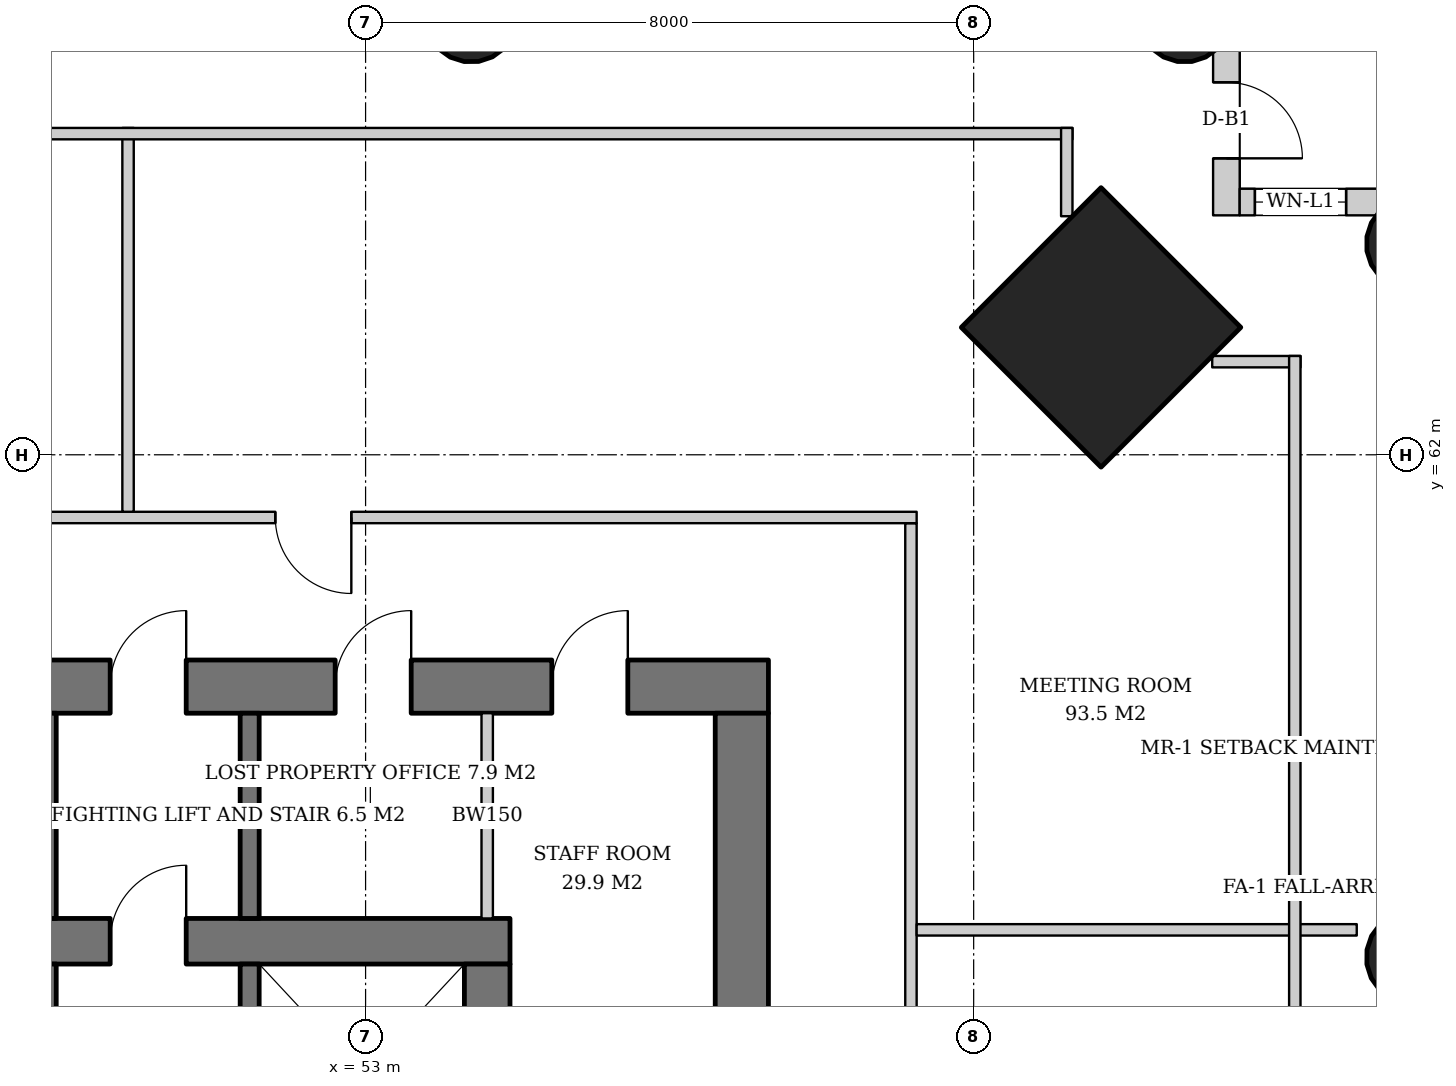
"""IFC4 building model, lengths in metres.
Left out: names, types, materials, properties, quantities, classifications, styles, units other than length and angle.
Written with IfcOpenShell. Run it as: python <this file> out.ifc"""

import sys

from ifc_helpers import new_model, si_unit, direction, frame, frame_2d, origin, origin_2d, place, context, subcontext, project, spatial, rectangle, hollow_circle, extrude, element, fill, save


model = new_model("IFC4")
c1 = context("Model", 3, precision=1e-05, world=origin(), true_north=direction((0.0, 1.0)))
c2 = subcontext(c1, "Body", "Model", "MODEL_VIEW")
j1 = project(units=[si_unit("LENGTHUNIT", "METRE"), si_unit("PLANEANGLEUNIT", "RADIAN")], contexts=[c1])
p1 = place(None, origin())
s1 = spatial("IfcSite", under=j1, at=p1, CompositionType="ELEMENT")
p2 = place(p1, origin())
s2 = spatial("IfcBuilding", under=s1, at=p2, CompositionType="ELEMENT")
p3 = place(p2, frame((0.0, 0.0, 89.4)))
s3 = spatial("IfcBuildingStorey", under=s2, at=p3, CompositionType="ELEMENT", Elevation=89.4)
p4 = place(p3, frame((62.714, 63.714, 0.0), z_axis=(-0.031962158256, -0.031962158256, 0.998977898093), x_axis=(0.707106781187, -0.707106781187, 0.0)))
e1 = element("IfcColumn", 1, at=p4, inside=s3, PredefinedType="COLUMN", context=c2, shape_type="SweptSolid", body=[
    extrude(rectangle(XDim=2.6, YDim=2.6, at=origin_2d()), origin(), (0.0, 0.0, 1.0), 3.804),
])
p5 = place(p3, frame((66.814, 64.814, 0.0), z_axis=(-0.031898107953, -0.031898107953, 0.998981992539), x_axis=(0.707106781187, -0.707106781187, 0.0)))
e2 = element("IfcColumn", 2, at=p5, inside=s3, PredefinedType="COLUMN", context=c2, shape_type="SweptSolid", body=[
    extrude(hollow_circle(Radius=0.61, WallThickness=0.04, at=origin_2d()), origin(), (0.0, 0.0, 1.0), 3.804),
])
p6 = place(p3, frame((66.814, 55.407, 0.0), z_axis=(-0.031910269556, -0.015987237665, 0.999362868496), x_axis=(0.447933021895, -0.894067115991, 0.0)))
e3 = element("IfcColumn", 3, at=p6, inside=s3, PredefinedType="COLUMN", context=c2, shape_type="SweptSolid", body=[
    extrude(hollow_circle(Radius=0.61, WallThickness=0.04, at=origin_2d()), origin(), (0.0, 0.0, 1.0), 3.802),
])
p7 = place(p3, frame((63.814, 67.814, 0.0), z_axis=(-0.031898107953, -0.031898107953, 0.998981992539), x_axis=(0.707106781187, -0.707106781187, 0.0)))
e4 = element("IfcColumn", 4, at=p7, inside=s3, PredefinedType="COLUMN", context=c2, shape_type="SweptSolid", body=[
    extrude(hollow_circle(Radius=0.61, WallThickness=0.04, at=origin_2d()), origin(), (0.0, 0.0, 1.0), 3.804),
])
p8 = place(p3, frame((54.407, 67.814, 0.0), z_axis=(-0.015987237665, -0.031910269556, 0.999362868496), x_axis=(0.894067115991, -0.447933021895, 0.0)))
e5 = element("IfcColumn", 5, at=p8, inside=s3, PredefinedType="COLUMN", context=c2, shape_type="SweptSolid", body=[
    extrude(hollow_circle(Radius=0.61, WallThickness=0.04, at=origin_2d()), origin(), (0.0, 0.0, 1.0), 3.802),
])
p9 = place(p3, frame((35.1, 55.6, 0.0), z_axis=(0.0, 0.0, 1.0), x_axis=(1.0, 0.0, 0.0)))
e6 = element("IfcWall", 6, at=p9, inside=s3, PredefinedType="SHEAR", context=c2, shape_type="SweptSolid", body=[
    extrude(rectangle(XDim=19.8, YDim=0.6, at=frame_2d((9.9, 0.0))), origin(), (0.0, 0.0, 1.0), 3.8),
])
p10 = place(p9, frame((14.54, 0.0, 0.0)))
e7 = element("IfcOpeningElement", 7, at=p10, cuts=e6, PredefinedType="OPENING", context=c2, shape_type="SweptSolid", body=[
    extrude(rectangle(XDim=1.0, YDim=2.1, at=frame_2d((0.5, 1.05))), frame((0.0, 0.31, 0.0), z_axis=(0.0, -1.0, 0.0), x_axis=(1.0, 0.0, 0.0)), (0.0, 0.0, 1.0), 0.62),
])
p11 = place(p9, frame((2.425, 0.0, 0.0)))
e8 = element("IfcOpeningElement", 8, at=p11, cuts=e6, PredefinedType="OPENING", context=c2, shape_type="SweptSolid", body=[
    extrude(rectangle(XDim=1.0, YDim=2.1, at=frame_2d((0.5, 1.05))), frame((0.0, 0.31, 0.0), z_axis=(0.0, -1.0, 0.0), x_axis=(1.0, 0.0, 0.0)), (0.0, 0.0, 1.0), 0.62),
])
p12 = place(p3, frame((54.6, 36.7, 0.0), z_axis=(0.0, 0.0, 1.0), x_axis=(0.0, 1.0, 0.0)))
e9 = element("IfcWall", 9, at=p12, inside=s3, PredefinedType="SHEAR", context=c2, shape_type="SweptSolid", body=[
    extrude(rectangle(XDim=18.6, YDim=0.6, at=frame_2d((9.3, 0.0))), origin(), (0.0, 0.0, 1.0), 3.8),
])
p13 = place(p12, frame((8.4, 0.0, 0.0)))
e10 = element("IfcOpeningElement", 10, at=p13, cuts=e9, PredefinedType="OPENING", context=c2, shape_type="SweptSolid", body=[
    extrude(rectangle(XDim=1.8, YDim=2.4, at=frame_2d((0.9, 1.2))), frame((0.0, 0.31, 0.0), z_axis=(0.0, -1.0, 0.0), x_axis=(1.0, 0.0, 0.0)), (0.0, 0.0, 1.0), 0.62),
])
p14 = place(p3, frame((31.7, 58.95, 0.0), z_axis=(0.0, 0.0, 1.0), x_axis=(1.0, 0.0, 0.0)))
e11 = element("IfcWall", 11, at=p14, inside=s3, PredefinedType="SHEAR", context=c2, shape_type="SweptSolid", body=[
    extrude(rectangle(XDim=26.6, YDim=0.7, at=frame_2d((13.3, 0.0))), origin(), (0.0, 0.0, 1.0), 3.8),
])
p15 = place(p14, frame((17.94, 0.0, 0.0)))
e12 = element("IfcOpeningElement", 12, at=p15, cuts=e11, PredefinedType="OPENING", context=c2, shape_type="SweptSolid", body=[
    extrude(rectangle(XDim=1.0, YDim=2.1, at=frame_2d((0.5, 1.05))), frame((0.0, 0.36, 0.0), z_axis=(0.0, -1.0, 0.0), x_axis=(1.0, 0.0, 0.0)), (0.0, 0.0, 1.0), 0.72),
])
p16 = place(p14, frame((5.825, 0.0, 0.0)))
e13 = element("IfcOpeningElement", 13, at=p16, cuts=e11, PredefinedType="OPENING", context=c2, shape_type="SweptSolid", body=[
    extrude(rectangle(XDim=1.0, YDim=2.1, at=frame_2d((0.5, 1.05))), frame((0.0, 0.36, 0.0), z_axis=(0.0, -1.0, 0.0), x_axis=(1.0, 0.0, 0.0)), (0.0, 0.0, 1.0), 0.72),
])
p17 = place(p14, frame((1.837, 0.0, 0.0)))
e14 = element("IfcOpeningElement", 14, at=p17, cuts=e11, PredefinedType="OPENING", context=c2, shape_type="SweptSolid", body=[
    extrude(rectangle(XDim=1.0, YDim=2.1, at=frame_2d((0.5, 1.05))), frame((0.0, 0.36, 0.0), z_axis=(0.0, -1.0, 0.0), x_axis=(1.0, 0.0, 0.0)), (0.0, 0.0, 1.0), 0.72),
])
p18 = place(p14, frame((3.781, 0.0, 0.0)))
e15 = element("IfcOpeningElement", 15, at=p18, cuts=e11, PredefinedType="OPENING", context=c2, shape_type="SweptSolid", body=[
    extrude(rectangle(XDim=1.0, YDim=2.1, at=frame_2d((0.5, 1.05))), frame((0.0, 0.36, 0.0), z_axis=(0.0, -1.0, 0.0), x_axis=(1.0, 0.0, 0.0)), (0.0, 0.0, 1.0), 0.72),
])
p19 = place(p14, frame((11.577, 0.0, 0.0)))
e16 = element("IfcOpeningElement", 16, at=p19, cuts=e11, PredefinedType="OPENING", context=c2, shape_type="SweptSolid", body=[
    extrude(rectangle(XDim=1.0, YDim=2.1, at=frame_2d((0.5, 1.05))), frame((0.0, 0.36, 0.0), z_axis=(0.0, -1.0, 0.0), x_axis=(1.0, 0.0, 0.0)), (0.0, 0.0, 1.0), 0.72),
])
p20 = place(p14, frame((20.9, 0.0, 0.0)))
e17 = element("IfcOpeningElement", 17, at=p20, cuts=e11, PredefinedType="OPENING", context=c2, shape_type="SweptSolid", body=[
    extrude(rectangle(XDim=1.0, YDim=2.1, at=frame_2d((0.5, 1.05))), frame((0.0, 0.36, 0.0), z_axis=(0.0, -1.0, 0.0), x_axis=(1.0, 0.0, 0.0)), (0.0, 0.0, 1.0), 0.72),
])
p21 = place(p14, frame((23.75, 0.0, 0.0)))
e18 = element("IfcOpeningElement", 18, at=p21, cuts=e11, PredefinedType="OPENING", context=c2, shape_type="SweptSolid", body=[
    extrude(rectangle(XDim=1.0, YDim=2.1, at=frame_2d((0.5, 1.05))), frame((0.0, 0.36, 0.0), z_axis=(0.0, -1.0, 0.0), x_axis=(1.0, 0.0, 0.0)), (0.0, 0.0, 1.0), 0.72),
])
p22 = place(p3, frame((57.95, 33.4, 0.0), z_axis=(0.0, 0.0, 1.0), x_axis=(0.0, 1.0, 0.0)))
e19 = element("IfcWall", 19, at=p22, inside=s3, PredefinedType="SHEAR", context=c2, shape_type="SweptSolid", body=[
    extrude(rectangle(XDim=25.2, YDim=0.7, at=frame_2d((12.6, 0.0))), origin(), (0.0, 0.0, 1.0), 3.8),
])
p23 = place(p22, frame((11.7, 0.0, 0.0)))
e20 = element("IfcOpeningElement", 20, at=p23, cuts=e19, PredefinedType="OPENING", context=c2, shape_type="SweptSolid", body=[
    extrude(rectangle(XDim=1.8, YDim=2.4, at=frame_2d((0.9, 1.2))), frame((0.0, 0.36, 0.0), z_axis=(0.0, -1.0, 0.0), x_axis=(1.0, 0.0, 0.0)), (0.0, 0.0, 1.0), 0.72),
])
p24 = place(p3, frame((48.73, 52.4, 0.0), z_axis=(0.0, 0.0, 1.0), x_axis=(0.0, 1.0, 0.0)))
e21 = element("IfcWall", 21, at=p24, inside=s3, PredefinedType="SHEAR", context=c2, shape_type="SweptSolid", body=[
    extrude(rectangle(XDim=2.9, YDim=0.4, at=frame_2d((1.45, 0.0))), origin(), (0.0, 0.0, 1.0), 3.8),
])
p25 = place(p24, frame((0.3, 0.0, 0.0)))
e22 = element("IfcOpeningElement", 22, at=p25, cuts=e21, PredefinedType="OPENING", context=c2, shape_type="SweptSolid", body=[
    extrude(rectangle(XDim=1.0, YDim=2.1, at=frame_2d((0.5, 1.05))), frame((0.0, 0.21, 0.0), z_axis=(0.0, -1.0, 0.0), x_axis=(1.0, 0.0, 0.0)), (0.0, 0.0, 1.0), 0.42),
])
p26 = place(p3, frame((64.325, 68.5, 0.0), z_axis=(0.0, 0.0, 1.0), x_axis=(0.0, -1.0, 0.0)))
e23 = element("IfcWall", 23, at=p26, inside=s3, PredefinedType="SOLIDWALL", context=c2, shape_type="SweptSolid", body=[
    extrude(rectangle(XDim=3.35, YDim=0.35, at=frame_2d((1.675, 0.0))), origin(), (0.0, 0.0, 1.0), 3.62),
])
p27 = place(p26, frame((1.6, 0.0, 0.0)))
e24 = element("IfcOpeningElement", 24, at=p27, cuts=e23, PredefinedType="OPENING", context=c2, shape_type="SweptSolid", body=[
    extrude(rectangle(XDim=1.0, YDim=2.4, at=frame_2d((0.5, 1.2))), frame((0.0, 0.185, 0.0), z_axis=(0.0, -1.0, 0.0), x_axis=(1.0, 0.0, 0.0)), (0.0, 0.0, 1.0), 0.37),
])
p28 = place(p3, frame((64.5, 65.325, 0.0), z_axis=(0.0, 0.0, 1.0), x_axis=(1.0, 0.0, 0.0)))
e25 = element("IfcWall", 25, at=p28, inside=s3, PredefinedType="SOLIDWALL", context=c2, shape_type="SweptSolid", body=[
    extrude(rectangle(XDim=3.0, YDim=0.35, at=frame_2d((1.5, 0.0))), origin(), (0.0, 0.0, 1.0), 3.62),
])
p29 = place(p28, frame((0.2, 0.0, 0.6)))
e26 = element("IfcOpeningElement", 26, at=p29, cuts=e25, PredefinedType="OPENING", context=c2, shape_type="SweptSolid", body=[
    extrude(rectangle(XDim=1.2, YDim=2.55, at=frame_2d((0.6, 1.275))), frame((0.0, 0.185, 0.0), z_axis=(0.0, -1.0, 0.0), x_axis=(1.0, 0.0, 0.0)), (0.0, 0.0, 1.0), 0.37),
])
p30 = place(p3, frame((51.475, 52.4, 0.0), z_axis=(0.0, 0.0, 1.0), x_axis=(0.0, 1.0, 0.0)))
e27 = element("IfcWall", 27, at=p30, inside=s3, PredefinedType="SHEAR", context=c2, shape_type="SweptSolid", body=[
    extrude(rectangle(XDim=2.9, YDim=0.25, at=frame_2d((1.45, 0.0))), origin(), (0.0, 0.0, 1.0), 3.8),
])
p31 = place(p30, frame((0.8, 0.0, 0.0)))
e28 = element("IfcOpeningElement", 28, at=p31, cuts=e27, PredefinedType="OPENING", context=c2, shape_type="SweptSolid", body=[
    extrude(rectangle(XDim=1.3, YDim=2.2, at=frame_2d((0.65, 1.1))), frame((0.0, 0.135, 0.0), z_axis=(0.0, -1.0, 0.0), x_axis=(1.0, 0.0, 0.0)), (0.0, 0.0, 1.0), 0.27),
])
for number, where, z_axis, x_axis in (
    (29, (48.805, 55.9, 0.0), (0.0, 0.0, 1.0), (0.0, 1.0, 0.0)),
    (30, (51.475, 55.9, 0.0), (0.0, 0.0, 1.0), (0.0, 1.0, 0.0)),
):
    element("IfcWall", number, at=place(p3, frame(where, z_axis=z_axis, x_axis=x_axis)), inside=s3, PredefinedType="SOLIDWALL", context=c2, shape_type="SweptSolid", body=[
        extrude(rectangle(XDim=2.7, YDim=0.25, at=frame_2d((1.35, 0.0))), origin(), (0.0, 0.0, 1.0), 3.62),
    ])
p32 = place(p3, frame((54.6, 55.9, 0.0), z_axis=(0.0, 0.0, 1.0), x_axis=(0.0, 1.0, 0.0)))
e31 = element("IfcWall", 31, at=p32, inside=s3, PredefinedType="SOLIDWALL", context=c2, shape_type="SweptSolid", body=[
    extrude(rectangle(XDim=2.7, YDim=0.15, at=frame_2d((1.35, 0.0))), origin(), (0.0, 0.0, 1.0), 3.62),
])
p33 = place(p3, frame((60.175, 30.75, 0.0), z_axis=(0.0, 0.0, 1.0), x_axis=(0.0, 1.0, 0.0)))
e32 = element("IfcWall", 32, at=p33, inside=s3, PredefinedType="PARTITIONING", context=c2, shape_type="SweptSolid", body=[
    extrude(rectangle(XDim=30.35, YDim=0.15, at=frame_2d((15.175, 0.0))), origin(), (0.0, 0.0, 1.0), 2.612),
])
p34 = place(p33, frame((7.438, 0.0, 0.0)))
e33 = element("IfcOpeningElement", 33, at=p34, cuts=e32, PredefinedType="OPENING", context=c2, shape_type="SweptSolid", body=[
    extrude(rectangle(XDim=1.0, YDim=2.1, at=frame_2d((0.5, 1.05))), frame((0.0, 0.085, 0.0), z_axis=(0.0, -1.0, 0.0), x_axis=(1.0, 0.0, 0.0)), (0.0, 0.0, 1.0), 0.17),
])
p35 = place(p33, frame((11.913, 0.0, 0.0)))
e34 = element("IfcOpeningElement", 34, at=p35, cuts=e32, PredefinedType="OPENING", context=c2, shape_type="SweptSolid", body=[
    extrude(rectangle(XDim=1.8, YDim=2.4, at=frame_2d((0.9, 1.2))), frame((0.0, 0.085, 0.0), z_axis=(0.0, -1.0, 0.0), x_axis=(1.0, 0.0, 0.0)), (0.0, 0.0, 1.0), 0.17),
])
p36 = place(p33, frame((16.788, 0.0, 0.0)))
e35 = element("IfcOpeningElement", 35, at=p36, cuts=e32, PredefinedType="OPENING", context=c2, shape_type="SweptSolid", body=[
    extrude(rectangle(XDim=1.8, YDim=2.4, at=frame_2d((0.9, 1.2))), frame((0.0, 0.085, 0.0), z_axis=(0.0, -1.0, 0.0), x_axis=(1.0, 0.0, 0.0)), (0.0, 0.0, 1.0), 0.17),
])
p37 = place(p3, frame((60.25, 55.75, 0.0), z_axis=(0.0, 0.0, 1.0), x_axis=(1.0, 0.0, 0.0)))
e36 = element("IfcWall", 36, at=p37, inside=s3, PredefinedType="PARTITIONING", context=c2, shape_type="SweptSolid", body=[
    extrude(rectangle(XDim=5.79, YDim=0.15, at=frame_2d((2.895, 0.0))), origin(), (0.0, 0.0, 1.0), 3.62),
])
p38 = place(p3, frame((60.25, 61.175, 0.0), z_axis=(0.0, 0.0, 1.0), x_axis=(-1.0, 0.0, 0.0)))
e37 = element("IfcWall", 37, at=p38, inside=s3, PredefinedType="PARTITIONING", context=c2, shape_type="SweptSolid", body=[
    extrude(rectangle(XDim=30.35, YDim=0.15, at=frame_2d((15.175, 0.0))), origin(), (0.0, 0.0, 1.0), 2.612),
])
p39 = place(p38, frame((7.438, 0.0, 0.0)))
e38 = element("IfcOpeningElement", 38, at=p39, cuts=e37, PredefinedType="OPENING", context=c2, shape_type="SweptSolid", body=[
    extrude(rectangle(XDim=1.0, YDim=2.1, at=frame_2d((0.5, 1.05))), frame((0.0, 0.085, 0.0), z_axis=(0.0, -1.0, 0.0), x_axis=(1.0, 0.0, 0.0)), (0.0, 0.0, 1.0), 0.17),
])
p40 = place(p38, frame((12.312, 0.0, 0.0)))
e39 = element("IfcOpeningElement", 39, at=p40, cuts=e37, PredefinedType="OPENING", context=c2, shape_type="SweptSolid", body=[
    extrude(rectangle(XDim=1.0, YDim=2.1, at=frame_2d((0.5, 1.05))), frame((0.0, 0.085, 0.0), z_axis=(0.0, -1.0, 0.0), x_axis=(1.0, 0.0, 0.0)), (0.0, 0.0, 1.0), 0.17),
])
p41 = place(p38, frame((17.188, 0.0, 0.0)))
e40 = element("IfcOpeningElement", 40, at=p41, cuts=e37, PredefinedType="OPENING", context=c2, shape_type="SweptSolid", body=[
    extrude(rectangle(XDim=1.0, YDim=2.1, at=frame_2d((0.5, 1.05))), frame((0.0, 0.085, 0.0), z_axis=(0.0, -1.0, 0.0), x_axis=(1.0, 0.0, 0.0)), (0.0, 0.0, 1.0), 0.17),
])
p42 = place(p38, frame((22.062, 0.0, 0.0)))
e41 = element("IfcOpeningElement", 41, at=p42, cuts=e37, PredefinedType="OPENING", context=c2, shape_type="SweptSolid", body=[
    extrude(rectangle(XDim=1.0, YDim=2.1, at=frame_2d((0.5, 1.05))), frame((0.0, 0.085, 0.0), z_axis=(0.0, -1.0, 0.0), x_axis=(1.0, 0.0, 0.0)), (0.0, 0.0, 1.0), 0.17),
])
p43 = place(p3, frame((49.875, 61.25, 0.0), z_axis=(0.0, 0.0, 1.0), x_axis=(0.0, 1.0, 0.0)))
e42 = element("IfcWall", 42, at=p43, inside=s3, PredefinedType="PARTITIONING", context=c2, shape_type="SweptSolid", body=[
    extrude(rectangle(XDim=5.05, YDim=0.15, at=frame_2d((2.525, 0.0))), origin(), (0.0, 0.0, 1.0), 3.62),
])
p44 = place(p3, frame((27.7, 66.225, 0.0), z_axis=(0.0, 0.0, 1.0), x_axis=(1.0, 0.0, 0.0)))
e43 = element("IfcWall", 43, at=p44, inside=s3, PredefinedType="PARTITIONING", context=c2, shape_type="SweptSolid", body=[
    extrude(rectangle(XDim=34.6, YDim=0.15, at=frame_2d((17.3, 0.0))), origin(), (0.0, 0.0, 1.0), 2.612),
])
for number, where, z_axis, x_axis in (
    (44, (62.225, 66.3, 0.0), (0.0, 0.0, 1.0), (0.0, -1.0, 0.0)),
    (45, (64.138, 63.225, 0.0), (0.0, 0.0, 1.0), (1.0, 0.0, 0.0)),
):
    element("IfcWall", number, at=place(p3, frame(where, z_axis=z_axis, x_axis=x_axis)), inside=s3, PredefinedType="PARTITIONING", context=c2, shape_type="SweptSolid", body=[
        extrude(rectangle(XDim=1.162, YDim=0.15, at=frame_2d((0.581, 0.0))), origin(), (0.0, 0.0, 1.0), 3.62),
    ])
p45 = place(p3, frame((65.225, 63.3, 0.0), z_axis=(0.0, 0.0, 1.0), x_axis=(0.0, -1.0, 0.0)))
e46 = element("IfcWall", 46, at=p45, inside=s3, PredefinedType="PARTITIONING", context=c2, shape_type="SweptSolid", body=[
    extrude(rectangle(XDim=34.6, YDim=0.15, at=frame_2d((17.3, 0.0))), origin(), (0.0, 0.0, 1.0), 2.612),
])
p46 = place(p27, origin())
e47 = element("IfcDoor", 47, at=p46, inside=s3, OperationType="SINGLE_SWING_RIGHT", PredefinedType="DOOR", context=c2, shape_type="SweptSolid", body=[
    extrude(rectangle(XDim=1.0, YDim=2.4, at=frame_2d((0.5, 1.2))), frame((0.0, 0.025, 0.0), z_axis=(0.0, -1.0, 0.0), x_axis=(1.0, 0.0, 0.0)), (0.0, 0.0, 1.0), 0.05),
])
fill(e24, e47)
p47 = place(p29, origin())
e48 = element("IfcWindow", 48, at=p47, inside=s3, PartitioningType="SINGLE_PANEL", PredefinedType="WINDOW", context=c2, shape_type="SweptSolid", body=[
    extrude(rectangle(XDim=1.2, YDim=2.55, at=frame_2d((0.6, 1.275))), frame((0.0, 0.03, 0.0), z_axis=(0.0, -1.0, 0.0), x_axis=(1.0, 0.0, 0.0)), (0.0, 0.0, 1.0), 0.06),
])
fill(e26, e48)
p48 = place(p10, origin())
e49 = element("IfcDoor", 49, at=p48, inside=s3, OperationType="SINGLE_SWING_RIGHT", PredefinedType="DOOR", context=c2, shape_type="SweptSolid", body=[
    extrude(rectangle(XDim=1.0, YDim=2.1, at=frame_2d((0.5, 1.05))), frame((0.0, 0.025, 0.0), z_axis=(0.0, -1.0, 0.0), x_axis=(1.0, 0.0, 0.0)), (0.0, 0.0, 1.0), 0.05),
])
fill(e7, e49)
p49 = place(p15, origin())
e50 = element("IfcDoor", 50, at=p49, inside=s3, OperationType="SINGLE_SWING_RIGHT", PredefinedType="DOOR", context=c2, shape_type="SweptSolid", body=[
    extrude(rectangle(XDim=1.0, YDim=2.1, at=frame_2d((0.5, 1.05))), frame((0.0, 0.025, 0.0), z_axis=(0.0, -1.0, 0.0), x_axis=(1.0, 0.0, 0.0)), (0.0, 0.0, 1.0), 0.05),
])
fill(e12, e50)
p50 = place(p20, origin())
e51 = element("IfcDoor", 51, at=p50, inside=s3, OperationType="SINGLE_SWING_RIGHT", PredefinedType="DOOR", context=c2, shape_type="SweptSolid", body=[
    extrude(rectangle(XDim=1.0, YDim=2.1, at=frame_2d((0.5, 1.05))), frame((0.0, -0.29, 0.0), z_axis=(0.0, -1.0, 0.0), x_axis=(1.0, 0.0, 0.0)), (0.0, 0.0, 1.0), 0.05),
])
fill(e17, e51)
p51 = place(p21, origin())
e52 = element("IfcDoor", 52, at=p51, inside=s3, OperationType="SINGLE_SWING_RIGHT", PredefinedType="DOOR", context=c2, shape_type="SweptSolid", body=[
    extrude(rectangle(XDim=1.0, YDim=2.1, at=frame_2d((0.5, 1.05))), frame((0.0, -0.29, 0.0), z_axis=(0.0, -1.0, 0.0), x_axis=(1.0, 0.0, 0.0)), (0.0, 0.0, 1.0), 0.05),
])
fill(e18, e52)
p52 = place(p39, origin())
e53 = element("IfcDoor", 53, at=p52, inside=s3, OperationType="SINGLE_SWING_LEFT", PredefinedType="DOOR", context=c2, shape_type="SweptSolid", body=[
    extrude(rectangle(XDim=1.0, YDim=2.1, at=frame_2d((0.5, 1.05))), frame((0.0, 0.025, 0.0), z_axis=(0.0, -1.0, 0.0), x_axis=(1.0, 0.0, 0.0)), (0.0, 0.0, 1.0), 0.05),
])
fill(e38, e53)
save(model, sys.argv[1])
